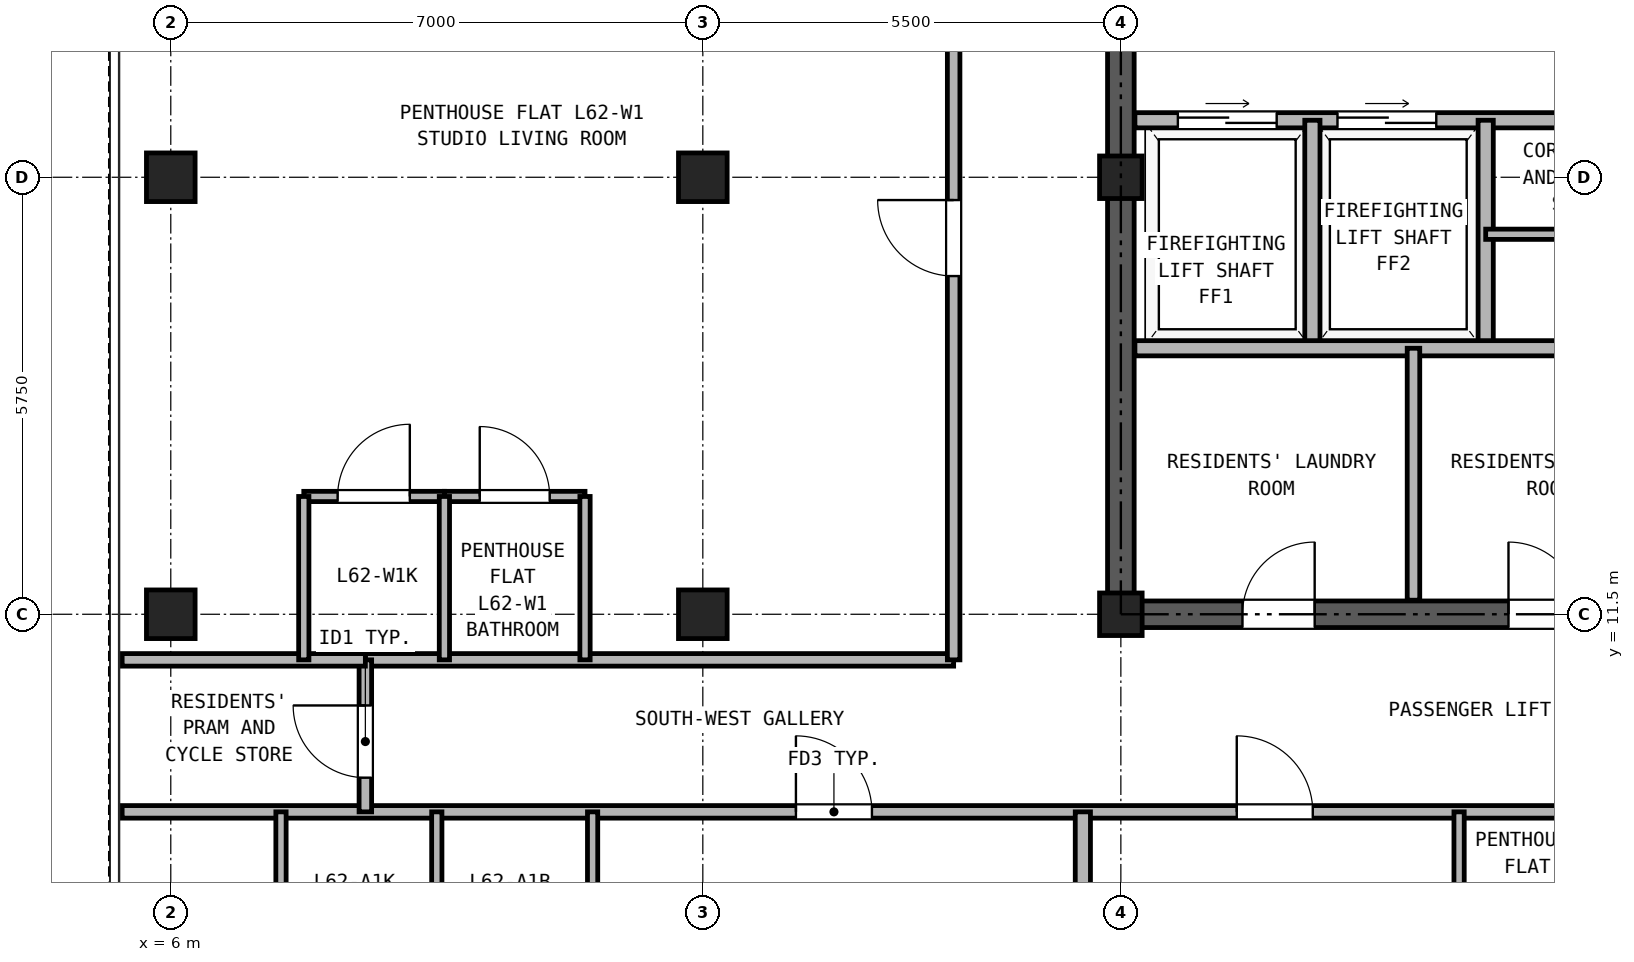
"""IFC4 building model, lengths in metres.
Left out: names, types, materials, properties, quantities, classifications, styles, units other than length and angle.
Written with IfcOpenShell. Run it as: python <this file> out.ifc"""

import sys

from ifc_helpers import new_model, si_unit, direction, frame, frame_2d, origin, origin_2d, place, context, subcontext, project, spatial, rectangle, hollow_rectangle, extrude, source, transform, mapped, element, fill, save


model = new_model("IFC4")
c1 = context("Model", 3, precision=1e-05, world=origin(), true_north=direction((0.0, 1.0)))
c2 = subcontext(c1, "Body", "Model", "MODEL_VIEW")
j1 = project(units=[si_unit("LENGTHUNIT", "METRE"), si_unit("PLANEANGLEUNIT", "RADIAN")], contexts=[c1])
p1 = place(None, origin())
s1 = spatial("IfcSite", under=j1, at=p1, CompositionType="ELEMENT")
p2 = place(p1, origin())
s2 = spatial("IfcBuilding", under=s1, at=p2, CompositionType="ELEMENT")
p3 = place(p2, frame((0.0, 0.0, 220.1)))
s3 = spatial("IfcBuildingStorey", under=s2, at=p3, CompositionType="ELEMENT", Elevation=220.1)
m1 = source(origin(), c2, "Body", "SweptSolid", [
    extrude(hollow_rectangle(XDim=0.64, YDim=0.64, WallThickness=0.035, at=origin_2d()), origin(), (0.0, 0.0, 1.0), 2.98),
])
for number, where, z_axis, x_axis in (
    (1, (6.0, 11.5, 0.0), (0.0, 0.0, 1.0), (1.0, 0.0, 0.0)),
    (2, (6.0, 17.25, 0.0), (0.0, 0.0, 1.0), (1.0, 0.0, 0.0)),
    (3, (13.0, 11.5, 0.0), (0.0, 0.0, 1.0), (1.0, 0.0, 0.0)),
    (4, (13.0, 17.25, 0.0), (0.0, 0.0, 1.0), (1.0, 0.0, 0.0)),
):
    element("IfcColumn", number, at=place(p3, frame(where, z_axis=z_axis, x_axis=x_axis)), inside=s3, PredefinedType="COLUMN", context=c2, shape_type="MappedRepresentation", body=[
        mapped(m1, transform((0.0, 0.0, 0.0), x_axis=(1.0, 0.0, 0.0), y_axis=(0.0, 1.0, 0.0), z_axis=(0.0, 0.0, 1.0), scale=1.0)),
    ])
m2 = source(origin(), c2, "Body", "SweptSolid", [
    extrude(hollow_rectangle(XDim=0.56, YDim=0.56, WallThickness=0.03, at=origin_2d()), origin(), (0.0, 0.0, 1.0), 2.98),
])
for number, where, z_axis, x_axis in (
    (5, (18.5, 11.5, 0.0), (0.0, 0.0, 1.0), (1.0, 0.0, 0.0)),
    (6, (18.5, 17.25, 0.0), (0.0, 0.0, 1.0), (1.0, 0.0, 0.0)),
):
    element("IfcColumn", number, at=place(p3, frame(where, z_axis=z_axis, x_axis=x_axis)), inside=s3, PredefinedType="COLUMN", context=c2, shape_type="MappedRepresentation", body=[
        mapped(m2, transform((0.0, 0.0, 0.0), x_axis=(1.0, 0.0, 0.0), y_axis=(0.0, 1.0, 0.0), z_axis=(0.0, 0.0, 1.0), scale=1.0)),
    ])
p4 = place(p3, frame((18.325, 11.5, 0.0), z_axis=(0.0, 0.0, 1.0), x_axis=(1.0, 0.0, 0.0)))
e7 = element("IfcWall", 7, at=p4, inside=s3, PredefinedType="SHEAR", context=c2, shape_type="SweptSolid", body=[
    extrude(rectangle(XDim=10.35, YDim=0.35, at=frame_2d((5.175, 0.0))), origin(), (0.0, 0.0, 1.0), 2.98),
])
p5 = place(p4, frame((1.775, 0.0, 0.0)))
e8 = element("IfcOpeningElement", 8, at=p5, cuts=e7, PredefinedType="OPENING", context=c2, shape_type="SweptSolid", body=[
    extrude(rectangle(XDim=0.95, YDim=2.15, at=frame_2d((0.475, 1.075))), frame((0.0, 0.185, 0.0), z_axis=(0.0, -1.0, 0.0), x_axis=(1.0, 0.0, 0.0)), (0.0, 0.0, 1.0), 0.37),
])
p6 = place(p4, frame((5.275, 0.0, 0.0)))
e9 = element("IfcOpeningElement", 9, at=p6, cuts=e7, PredefinedType="OPENING", context=c2, shape_type="SweptSolid", body=[
    extrude(rectangle(XDim=0.95, YDim=2.15, at=frame_2d((0.475, 1.075))), frame((0.0, 0.185, 0.0), z_axis=(0.0, -1.0, 0.0), x_axis=(1.0, 0.0, 0.0)), (0.0, 0.0, 1.0), 0.37),
])
p7 = place(p4, frame((8.175, 0.0, 0.0)))
e10 = element("IfcOpeningElement", 10, at=p7, cuts=e7, PredefinedType="OPENING", context=c2, shape_type="SweptSolid", body=[
    extrude(rectangle(XDim=1.1, YDim=2.25, at=frame_2d((0.55, 1.125))), frame((0.0, 0.185, 0.0), z_axis=(0.0, -1.0, 0.0), x_axis=(1.0, 0.0, 0.0)), (0.0, 0.0, 1.0), 0.37),
])
p8 = place(p3, frame((18.5, 11.675, 0.0), z_axis=(0.0, 0.0, 1.0), x_axis=(0.0, 1.0, 0.0)))
e11 = element("IfcWall", 11, at=p8, inside=s3, PredefinedType="SHEAR", context=c2, shape_type="SweptSolid", body=[
    extrude(rectangle(XDim=16.9, YDim=0.35, at=frame_2d((8.45, 0.0))), origin(), (0.0, 0.0, 1.0), 2.98),
])
p9 = place(p8, frame((7.475, 0.0, 0.0)))
e12 = element("IfcOpeningElement", 12, at=p9, cuts=e11, PredefinedType="OPENING", context=c2, shape_type="SweptSolid", body=[
    extrude(rectangle(XDim=1.15, YDim=2.2, at=frame_2d((0.575, 1.1))), frame((0.0, 0.185, 0.0), z_axis=(0.0, -1.0, 0.0), x_axis=(1.0, 0.0, 0.0)), (0.0, 0.0, 1.0), 0.37),
])
p10 = place(p3, frame((18.685, 18.0, 0.0), z_axis=(0.0, 0.0, 1.0), x_axis=(1.0, 0.0, 0.0)))
e13 = element("IfcWall", 13, at=p10, inside=s3, PredefinedType="PARTITIONING", context=c2, shape_type="SweptSolid", body=[
    extrude(rectangle(XDim=9.63, YDim=0.2, at=frame_2d((4.815, 0.0))), origin(), (0.0, 0.0, 1.0), 2.98),
])
p11 = place(p10, frame((0.565, 0.0, 0.0)))
e14 = element("IfcOpeningElement", 14, at=p11, cuts=e13, PredefinedType="OPENING", context=c2, shape_type="SweptSolid", body=[
    extrude(rectangle(XDim=1.3, YDim=2.3, at=frame_2d((0.65, 1.15))), frame((0.0, 0.11, 0.0), z_axis=(0.0, -1.0, 0.0), x_axis=(1.0, 0.0, 0.0)), (0.0, 0.0, 1.0), 0.22),
])
p12 = place(p10, frame((2.665, 0.0, 0.0)))
e15 = element("IfcOpeningElement", 15, at=p12, cuts=e13, PredefinedType="OPENING", context=c2, shape_type="SweptSolid", body=[
    extrude(rectangle(XDim=1.3, YDim=2.3, at=frame_2d((0.65, 1.15))), frame((0.0, 0.11, 0.0), z_axis=(0.0, -1.0, 0.0), x_axis=(1.0, 0.0, 0.0)), (0.0, 0.0, 1.0), 0.22),
])
p13 = place(p10, frame((7.165, 0.0, 0.0)))
e16 = element("IfcOpeningElement", 16, at=p13, cuts=e13, PredefinedType="OPENING", context=c2, shape_type="SweptSolid", body=[
    extrude(rectangle(XDim=1.0, YDim=2.15, at=frame_2d((0.5, 1.075))), frame((0.0, 0.11, 0.0), z_axis=(0.0, -1.0, 0.0), x_axis=(1.0, 0.0, 0.0)), (0.0, 0.0, 1.0), 0.22),
])
for number, where, z_axis, x_axis in (
    (17, (21.02, 15.0, 0.0), (0.0, 0.0, 1.0), (0.0, 1.0, 0.0)),
    (18, (23.3, 15.0, 0.0), (0.0, 0.0, 1.0), (0.0, 1.0, 0.0)),
):
    element("IfcWall", number, at=place(p3, frame(where, z_axis=z_axis, x_axis=x_axis)), inside=s3, PredefinedType="PARTITIONING", context=c2, shape_type="SweptSolid", body=[
        extrude(rectangle(XDim=3.0, YDim=0.2, at=frame_2d((1.5, 0.0))), origin(), (0.0, 0.0, 1.0), 2.98),
    ])
p14 = place(p3, frame((18.685, 15.0, 0.0), z_axis=(0.0, 0.0, 1.0), x_axis=(1.0, 0.0, 0.0)))
e19 = element("IfcWall", 19, at=p14, inside=s3, PredefinedType="PARTITIONING", context=c2, shape_type="SweptSolid", body=[
    extrude(rectangle(XDim=9.63, YDim=0.2, at=frame_2d((4.815, 0.0))), origin(), (0.0, 0.0, 1.0), 2.98),
])
p15 = place(p3, frame((23.3, 16.5, 0.0), z_axis=(0.0, 0.0, 1.0), x_axis=(1.0, 0.0, 0.0)))
e20 = element("IfcWall", 20, at=p15, inside=s3, PredefinedType="PARTITIONING", context=c2, shape_type="SweptSolid", body=[
    extrude(rectangle(XDim=5.015, YDim=0.135, at=frame_2d((2.507, 0.0))), origin(), (0.0, 0.0, 1.0), 2.98),
])
p16 = place(p15, frame((2.55, 0.0, 0.0)))
e21 = element("IfcOpeningElement", 21, at=p16, cuts=e20, PredefinedType="OPENING", context=c2, shape_type="SweptSolid", body=[
    extrude(rectangle(XDim=0.9, YDim=2.05, at=frame_2d((0.45, 1.025))), frame((0.0, 0.077, 0.0), z_axis=(0.0, -1.0, 0.0), x_axis=(1.0, 0.0, 0.0)), (0.0, 0.0, 1.0), 0.155),
])
p17 = place(p3, frame((22.35, 11.685, 0.0), z_axis=(0.0, 0.0, 1.0), x_axis=(0.0, 1.0, 0.0)))
e22 = element("IfcWall", 22, at=p17, inside=s3, PredefinedType="PARTITIONING", context=c2, shape_type="SweptSolid", body=[
    extrude(rectangle(XDim=3.315, YDim=0.165, at=frame_2d((1.657, 0.0))), origin(), (0.0, 0.0, 1.0), 2.98),
])
p18 = place(p3, frame((5.36, 8.9, 0.0), z_axis=(0.0, 0.0, 1.0), x_axis=(1.0, 0.0, 0.0)))
e23 = element("IfcWall", 23, at=p18, inside=s3, PredefinedType="PARTITIONING", context=c2, shape_type="SweptSolid", body=[
    extrude(rectangle(XDim=36.28, YDim=0.165, at=frame_2d((18.14, 0.0))), origin(), (0.0, 0.0, 1.0), 2.98),
])
p19 = place(p18, frame((8.865, 0.0, 0.0)))
e24 = element("IfcOpeningElement", 24, at=p19, cuts=e23, PredefinedType="OPENING", context=c2, shape_type="SweptSolid", body=[
    extrude(rectangle(XDim=1.0, YDim=2.15, at=frame_2d((0.5, 1.075))), frame((0.0, 0.093, 0.0), z_axis=(0.0, -1.0, 0.0), x_axis=(1.0, 0.0, 0.0)), (0.0, 0.0, 1.0), 0.185),
])
p20 = place(p18, frame((14.665, 0.0, 0.0)))
e25 = element("IfcOpeningElement", 25, at=p20, cuts=e23, PredefinedType="OPENING", context=c2, shape_type="SweptSolid", body=[
    extrude(rectangle(XDim=1.0, YDim=2.15, at=frame_2d((0.5, 1.075))), frame((0.0, 0.093, 0.0), z_axis=(0.0, -1.0, 0.0), x_axis=(1.0, 0.0, 0.0)), (0.0, 0.0, 1.0), 0.185),
])
p21 = place(p18, frame((26.915, 0.0, 0.0)))
e26 = element("IfcOpeningElement", 26, at=p21, cuts=e23, PredefinedType="OPENING", context=c2, shape_type="SweptSolid", body=[
    extrude(rectangle(XDim=1.0, YDim=2.15, at=frame_2d((0.5, 1.075))), frame((0.0, 0.093, 0.0), z_axis=(0.0, -1.0, 0.0), x_axis=(1.0, 0.0, 0.0)), (0.0, 0.0, 1.0), 0.185),
])
p22 = place(p3, frame((8.56, 10.9, 0.0), z_axis=(0.0, 0.0, 1.0), x_axis=(1.0, 0.0, 0.0)))
e27 = element("IfcWall", 27, at=p22, inside=s3, PredefinedType="PARTITIONING", context=c2, shape_type="SweptSolid", body=[
    extrude(rectangle(XDim=7.74, YDim=0.165, at=frame_2d((3.87, 0.0))), origin(), (0.0, 0.0, 1.0), 2.98),
])
p23 = place(p3, frame((8.56, 8.9, 0.0), z_axis=(0.0, 0.0, 1.0), x_axis=(0.0, 1.0, 0.0)))
e28 = element("IfcWall", 28, at=p23, inside=s3, PredefinedType="PARTITIONING", context=c2, shape_type="SweptSolid", body=[
    extrude(rectangle(XDim=2.0, YDim=0.165, at=frame_2d((1.0, 0.0))), origin(), (0.0, 0.0, 1.0), 2.98),
])
p24 = place(p23, frame((0.45, 0.0, 0.0)))
e29 = element("IfcOpeningElement", 29, at=p24, cuts=e28, PredefinedType="OPENING", context=c2, shape_type="SweptSolid", body=[
    extrude(rectangle(XDim=0.95, YDim=2.15, at=frame_2d((0.475, 1.075))), frame((0.0, 0.093, 0.0), z_axis=(0.0, -1.0, 0.0), x_axis=(1.0, 0.0, 0.0)), (0.0, 0.0, 1.0), 0.185),
])
p25 = place(p3, frame((16.3, 10.9, 0.0), z_axis=(0.0, 0.0, 1.0), x_axis=(0.0, 1.0, 0.0)))
e30 = element("IfcWall", 30, at=p25, inside=s3, PredefinedType="PARTITIONING", context=c2, shape_type="SweptSolid", body=[
    extrude(rectangle(XDim=24.24, YDim=0.165, at=frame_2d((12.12, 0.0))), origin(), (0.0, 0.0, 1.0), 2.98),
])
p26 = place(p25, frame((5.05, 0.0, 0.0)))
e31 = element("IfcOpeningElement", 31, at=p26, cuts=e30, PredefinedType="OPENING", context=c2, shape_type="SweptSolid", body=[
    extrude(rectangle(XDim=1.0, YDim=2.15, at=frame_2d((0.5, 1.075))), frame((0.0, 0.093, 0.0), z_axis=(0.0, -1.0, 0.0), x_axis=(1.0, 0.0, 0.0)), (0.0, 0.0, 1.0), 0.185),
])
p27 = place(p25, frame((14.8, 0.0, 0.0)))
e32 = element("IfcOpeningElement", 32, at=p27, cuts=e30, PredefinedType="OPENING", context=c2, shape_type="SweptSolid", body=[
    extrude(rectangle(XDim=1.0, YDim=2.15, at=frame_2d((0.5, 1.075))), frame((0.0, 0.093, 0.0), z_axis=(0.0, -1.0, 0.0), x_axis=(1.0, 0.0, 0.0)), (0.0, 0.0, 1.0), 0.185),
])
for number, where, z_axis, x_axis in (
    (33, (7.45, 6.75, 0.0), (0.0, 0.0, 1.0), (0.0, 1.0, 0.0)),
    (34, (9.5, 6.75, 0.0), (0.0, 0.0, 1.0), (0.0, 1.0, 0.0)),
    (35, (11.55, 6.75, 0.0), (0.0, 0.0, 1.0), (0.0, 1.0, 0.0)),
):
    element("IfcWall", number, at=place(p3, frame(where, z_axis=z_axis, x_axis=x_axis)), inside=s3, PredefinedType="PARTITIONING", context=c2, shape_type="SweptSolid", body=[
        extrude(rectangle(XDim=2.15, YDim=0.135, at=frame_2d((1.075, 0.0))), origin(), (0.0, 0.0, 1.0), 2.98),
    ])
p28 = place(p3, frame((18.0, 0.16, 0.0), z_axis=(0.0, 0.0, 1.0), x_axis=(0.0, 1.0, 0.0)))
e36 = element("IfcWall", 36, at=p28, inside=s3, PredefinedType="PARTITIONING", context=c2, shape_type="SweptSolid", body=[
    extrude(rectangle(XDim=8.74, YDim=0.2, at=frame_2d((4.37, 0.0))), origin(), (0.0, 0.0, 1.0), 2.98),
])
p29 = place(p3, frame((22.95, 6.75, 0.0), z_axis=(0.0, 0.0, 1.0), x_axis=(0.0, 1.0, 0.0)))
e37 = element("IfcWall", 37, at=p29, inside=s3, PredefinedType="PARTITIONING", context=c2, shape_type="SweptSolid", body=[
    extrude(rectangle(XDim=2.15, YDim=0.135, at=frame_2d((1.075, 0.0))), origin(), (0.0, 0.0, 1.0), 2.98),
])
p30 = place(p3, frame((5.36, 10.9, 0.0), z_axis=(0.0, 0.0, 1.0), x_axis=(1.0, 0.0, 0.0)))
e38 = element("IfcWall", 38, at=p30, inside=s3, PredefinedType="PARTITIONING", context=c2, shape_type="SweptSolid", body=[
    extrude(rectangle(XDim=3.2, YDim=0.165, at=frame_2d((1.6, 0.0))), origin(), (0.0, 0.0, 1.0), 2.98),
])
p31 = place(p3, frame((7.75, 13.05, 0.0), z_axis=(0.0, 0.0, 1.0), x_axis=(1.0, 0.0, 0.0)))
e39 = element("IfcWall", 39, at=p31, inside=s3, PredefinedType="PARTITIONING", context=c2, shape_type="SweptSolid", body=[
    extrude(rectangle(XDim=1.85, YDim=0.135, at=frame_2d((0.925, 0.0))), origin(), (0.0, 0.0, 1.0), 2.98),
])
p32 = place(p31, frame((0.445, 0.0, 0.0)))
e40 = element("IfcOpeningElement", 40, at=p32, cuts=e39, PredefinedType="OPENING", context=c2, shape_type="SweptSolid", body=[
    extrude(rectangle(XDim=0.95, YDim=2.15, at=frame_2d((0.475, 1.075))), frame((0.0, 0.077, 0.0), z_axis=(0.0, -1.0, 0.0), x_axis=(1.0, 0.0, 0.0)), (0.0, 0.0, 1.0), 0.155),
])
p33 = place(p3, frame((9.6, 13.05, 0.0), z_axis=(0.0, 0.0, 1.0), x_axis=(1.0, 0.0, 0.0)))
e41 = element("IfcWall", 41, at=p33, inside=s3, PredefinedType="PARTITIONING", context=c2, shape_type="SweptSolid", body=[
    extrude(rectangle(XDim=1.85, YDim=0.135, at=frame_2d((0.925, 0.0))), origin(), (0.0, 0.0, 1.0), 2.98),
])
p34 = place(p33, frame((0.465, 0.0, 0.0)))
e42 = element("IfcOpeningElement", 42, at=p34, cuts=e41, PredefinedType="OPENING", context=c2, shape_type="SweptSolid", body=[
    extrude(rectangle(XDim=0.92, YDim=2.1, at=frame_2d((0.46, 1.05))), frame((0.0, 0.077, 0.0), z_axis=(0.0, -1.0, 0.0), x_axis=(1.0, 0.0, 0.0)), (0.0, 0.0, 1.0), 0.155),
])
for number, where, z_axis, x_axis in (
    (43, (7.75, 10.9, 0.0), (0.0, 0.0, 1.0), (0.0, 1.0, 0.0)),
    (44, (9.6, 10.9, 0.0), (0.0, 0.0, 1.0), (0.0, 1.0, 0.0)),
    (45, (11.45, 10.9, 0.0), (0.0, 0.0, 1.0), (0.0, 1.0, 0.0)),
):
    element("IfcWall", number, at=place(p3, frame(where, z_axis=z_axis, x_axis=x_axis)), inside=s3, PredefinedType="PARTITIONING", context=c2, shape_type="SweptSolid", body=[
        extrude(rectangle(XDim=2.15, YDim=0.135, at=frame_2d((1.075, 0.0))), origin(), (0.0, 0.0, 1.0), 2.98),
    ])
p35 = place(p11, origin())
e46 = element("IfcDoor", 46, at=p35, inside=s3, OperationType="DOUBLE_DOOR_SLIDING", PredefinedType="DOOR", context=c2, shape_type="SweptSolid", body=[
    extrude(rectangle(XDim=1.3, YDim=2.3, at=frame_2d((0.65, 1.15))), frame((0.0, 0.025, 0.0), z_axis=(0.0, -1.0, 0.0), x_axis=(1.0, 0.0, 0.0)), (0.0, 0.0, 1.0), 0.05),
])
fill(e14, e46)
p36 = place(p12, origin())
e47 = element("IfcDoor", 47, at=p36, inside=s3, OperationType="DOUBLE_DOOR_SLIDING", PredefinedType="DOOR", context=c2, shape_type="SweptSolid", body=[
    extrude(rectangle(XDim=1.3, YDim=2.3, at=frame_2d((0.65, 1.15))), frame((0.0, 0.025, 0.0), z_axis=(0.0, -1.0, 0.0), x_axis=(1.0, 0.0, 0.0)), (0.0, 0.0, 1.0), 0.05),
])
fill(e15, e47)
p37 = place(p5, frame((0.95, 0.0, 0.0), z_axis=(0.0, 0.0, 1.0), x_axis=(-1.0, 0.0, 0.0)))
e48 = element("IfcDoor", 48, at=p37, inside=s3, OperationType="SINGLE_SWING_RIGHT", PredefinedType="DOOR", context=c2, shape_type="SweptSolid", body=[
    extrude(rectangle(XDim=0.95, YDim=2.15, at=frame_2d((0.475, 1.075))), frame((0.0, 0.025, 0.0), z_axis=(0.0, -1.0, 0.0), x_axis=(1.0, 0.0, 0.0)), (0.0, 0.0, 1.0), 0.05),
])
fill(e8, e48)
p38 = place(p6, frame((0.95, 0.0, 0.0), z_axis=(0.0, 0.0, 1.0), x_axis=(-1.0, 0.0, 0.0)))
e49 = element("IfcDoor", 49, at=p38, inside=s3, OperationType="SINGLE_SWING_LEFT", PredefinedType="DOOR", context=c2, shape_type="SweptSolid", body=[
    extrude(rectangle(XDim=0.95, YDim=2.15, at=frame_2d((0.475, 1.075))), frame((0.0, 0.025, 0.0), z_axis=(0.0, -1.0, 0.0), x_axis=(1.0, 0.0, 0.0)), (0.0, 0.0, 1.0), 0.05),
])
fill(e9, e49)
p39 = place(p19, frame((1.0, 0.0, 0.0), z_axis=(0.0, 0.0, 1.0), x_axis=(-1.0, 0.0, 0.0)))
e50 = element("IfcDoor", 50, at=p39, inside=s3, OperationType="SINGLE_SWING_LEFT", PredefinedType="DOOR", context=c2, shape_type="SweptSolid", body=[
    extrude(rectangle(XDim=1.0, YDim=2.15, at=frame_2d((0.5, 1.075))), frame((0.0, 0.025, 0.0), z_axis=(0.0, -1.0, 0.0), x_axis=(1.0, 0.0, 0.0)), (0.0, 0.0, 1.0), 0.05),
])
fill(e24, e50)
p40 = place(p20, frame((1.0, 0.0, 0.0), z_axis=(0.0, 0.0, 1.0), x_axis=(-1.0, 0.0, 0.0)))
e51 = element("IfcDoor", 51, at=p40, inside=s3, OperationType="SINGLE_SWING_LEFT", PredefinedType="DOOR", context=c2, shape_type="SweptSolid", body=[
    extrude(rectangle(XDim=1.0, YDim=2.15, at=frame_2d((0.5, 1.075))), frame((0.0, 0.025, 0.0), z_axis=(0.0, -1.0, 0.0), x_axis=(1.0, 0.0, 0.0)), (0.0, 0.0, 1.0), 0.05),
])
fill(e25, e51)
p41 = place(p24, frame((0.95, 0.0, 0.0), z_axis=(0.0, 0.0, 1.0), x_axis=(-1.0, 0.0, 0.0)))
e52 = element("IfcDoor", 52, at=p41, inside=s3, OperationType="SINGLE_SWING_RIGHT", PredefinedType="DOOR", context=c2, shape_type="SweptSolid", body=[
    extrude(rectangle(XDim=0.95, YDim=2.15, at=frame_2d((0.475, 1.075))), frame((0.0, 0.025, 0.0), z_axis=(0.0, -1.0, 0.0), x_axis=(1.0, 0.0, 0.0)), (0.0, 0.0, 1.0), 0.05),
])
fill(e29, e52)
p42 = place(p32, origin())
e53 = element("IfcDoor", 53, at=p42, inside=s3, OperationType="SINGLE_SWING_RIGHT", PredefinedType="DOOR", context=c2, shape_type="SweptSolid", body=[
    extrude(rectangle(XDim=0.95, YDim=2.15, at=frame_2d((0.475, 1.075))), frame((0.0, 0.025, 0.0), z_axis=(0.0, -1.0, 0.0), x_axis=(1.0, 0.0, 0.0)), (0.0, 0.0, 1.0), 0.05),
])
fill(e40, e53)
p43 = place(p34, origin())
e54 = element("IfcDoor", 54, at=p43, inside=s3, OperationType="SINGLE_SWING_LEFT", PredefinedType="DOOR", context=c2, shape_type="SweptSolid", body=[
    extrude(rectangle(XDim=0.92, YDim=2.1, at=frame_2d((0.46, 1.05))), frame((0.0, 0.025, 0.0), z_axis=(0.0, -1.0, 0.0), x_axis=(1.0, 0.0, 0.0)), (0.0, 0.0, 1.0), 0.05),
])
fill(e42, e54)
p44 = place(p26, origin())
e55 = element("IfcDoor", 55, at=p44, inside=s3, OperationType="SINGLE_SWING_RIGHT", PredefinedType="DOOR", context=c2, shape_type="SweptSolid", body=[
    extrude(rectangle(XDim=1.0, YDim=2.15, at=frame_2d((0.5, 1.075))), frame((0.0, 0.025, 0.0), z_axis=(0.0, -1.0, 0.0), x_axis=(1.0, 0.0, 0.0)), (0.0, 0.0, 1.0), 0.05),
])
fill(e31, e55)
save(model, sys.argv[1])
